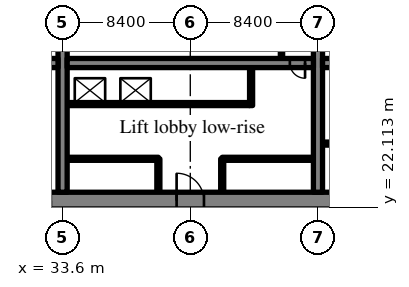
"""IFC4 building model, lengths in metres.
Left out: names, types, materials, properties, quantities, classifications, styles, units other than length and angle.
Written with IfcOpenShell. Run it as: python <this file> out.ifc"""

import sys

from ifc_helpers import new_model, si_unit, direction, frame, frame_2d, origin, place, context, subcontext, project, spatial, rectangle, extrude, source, transform, mapped, element, fill, save


model = new_model("IFC4")
c1 = context("Model", 3, precision=1e-05, world=origin(), true_north=direction((0.0, 1.0)))
c2 = subcontext(c1, "Body", "Model", "MODEL_VIEW")
j1 = project(units=[si_unit("LENGTHUNIT", "METRE"), si_unit("PLANEANGLEUNIT", "RADIAN")], contexts=[c1])
p1 = place(None, origin())
s1 = spatial("IfcSite", under=j1, at=p1, CompositionType="ELEMENT")
p2 = place(p1, origin())
s2 = spatial("IfcBuilding", under=s1, at=p2, CompositionType="ELEMENT")
p3 = place(p2, origin())
s3 = spatial("IfcBuildingStorey", under=s2, at=p3, CompositionType="ELEMENT", Elevation=0.0)
m1 = source(origin(), c2, "Body", "SweptSolid", [
    extrude(rectangle(XDim=50.4, YDim=1.1, at=frame_2d((25.2, 0.0))), origin(), (0.0, 0.0, 1.0), 5.72),
])
p4 = place(p3, frame((25.2, 22.55, 0.0), z_axis=(0.0, 0.0, 1.0), x_axis=(1.0, 0.0, 0.0)))
e1 = element("IfcWall", 1, at=p4, inside=s3, PredefinedType="SHEAR", context=c2, shape_type="MappedRepresentation", body=[
    mapped(m1, transform((0.0, 0.0, 0.0), scale=1.0)),
])
m2 = source(origin(), c2, "Body", "SweptSolid", [
    extrude(rectangle(XDim=1.8, YDim=2.1, at=frame_2d((0.9, 1.05))), frame((0.0, 0.56, 0.0), z_axis=(0.0, -1.0, 0.0), x_axis=(1.0, 0.0, 0.0)), (0.0, 0.0, 1.0), 1.12),
])
p5 = place(p4, frame((15.9, 0.0, 0.0)))
e2 = element("IfcOpeningElement", 2, at=p5, cuts=e1, PredefinedType="OPENING", context=c2, shape_type="MappedRepresentation", body=[
    mapped(m2, transform((0.0, 0.0, 0.0), scale=1.0)),
])
p6 = place(p4, frame((32.7, 0.0, 0.0)))
e3 = element("IfcOpeningElement", 3, at=p6, cuts=e1, PredefinedType="OPENING", context=c2, shape_type="MappedRepresentation", body=[
    mapped(m2, transform((0.0, 0.0, 0.0), scale=1.0)),
])
m3 = source(origin(), c2, "Body", "SweptSolid", [
    extrude(rectangle(XDim=0.9, YDim=2.1, at=frame_2d((0.45, 1.05))), frame((0.0, 0.56, 0.0), z_axis=(0.0, -1.0, 0.0), x_axis=(1.0, 0.0, 0.0)), (0.0, 0.0, 1.0), 1.12),
])
p7 = place(p4, frame((39.75, 0.0, 0.0)))
e4 = element("IfcOpeningElement", 4, at=p7, cuts=e1, PredefinedType="OPENING", context=c2, shape_type="MappedRepresentation", body=[
    mapped(m3, transform((0.0, 0.0, 0.0), scale=1.0)),
])
p8 = place(p4, frame((28.05, 0.0, 0.0)))
e5 = element("IfcOpeningElement", 5, at=p8, cuts=e1, PredefinedType="OPENING", context=c2, shape_type="MappedRepresentation", body=[
    mapped(m3, transform((0.0, 0.0, 0.0), scale=1.0)),
])
m4 = source(origin(), c2, "Body", "SweptSolid", [
    extrude(rectangle(XDim=1.2, YDim=2.1, at=frame_2d((0.6, 1.05))), frame((0.0, 0.56, 0.0), z_axis=(0.0, -1.0, 0.0), x_axis=(1.0, 0.0, 0.0)), (0.0, 0.0, 1.0), 1.12),
])
p9 = place(p4, frame((6.425, 0.0, 0.0)))
e6 = element("IfcOpeningElement", 6, at=p9, cuts=e1, PredefinedType="OPENING", context=c2, shape_type="MappedRepresentation", body=[
    mapped(m4, transform((0.0, 0.0, 0.0), scale=1.0)),
])
p10 = place(p4, frame((47.675, 0.0, 0.0)))
e7 = element("IfcOpeningElement", 7, at=p10, cuts=e1, PredefinedType="OPENING", context=c2, shape_type="MappedRepresentation", body=[
    mapped(m4, transform((0.0, 0.0, 0.0), scale=1.0)),
])
m5 = source(origin(), c2, "Body", "SweptSolid", [
    extrude(rectangle(XDim=17.8, YDim=0.6, at=frame_2d((8.9, 0.0))), origin(), (0.0, 0.0, 1.0), 5.72),
])
p11 = place(p3, frame((33.6, 23.1, 0.0), z_axis=(0.0, 0.0, 1.0), x_axis=(0.0, 1.0, 0.0)))
e8 = element("IfcWall", 8, at=p11, inside=s3, PredefinedType="SHEAR", context=c2, shape_type="MappedRepresentation", body=[
    mapped(m5, transform((0.0, 0.0, 0.0), scale=1.0)),
])
m6 = source(origin(), c2, "Body", "SweptSolid", [
    extrude(rectangle(XDim=1.1, YDim=2.1, at=frame_2d((0.55, 1.05))), frame((0.0, 0.31, 0.0), z_axis=(0.0, -1.0, 0.0), x_axis=(1.0, 0.0, 0.0)), (0.0, 0.0, 1.0), 0.62),
])
p12 = place(p11, frame((12.35, 0.0, 0.0)))
e9 = element("IfcOpeningElement", 9, at=p12, cuts=e8, PredefinedType="OPENING", context=c2, shape_type="MappedRepresentation", body=[
    mapped(m6, transform((0.0, 0.0, 0.0), scale=1.0)),
])
p13 = place(p3, frame((50.4, 23.1, 0.0), z_axis=(0.0, 0.0, 1.0), x_axis=(0.0, 1.0, 0.0)))
e10 = element("IfcWall", 10, at=p13, inside=s3, PredefinedType="SHEAR", context=c2, shape_type="MappedRepresentation", body=[
    mapped(m5, transform((0.0, 0.0, 0.0), scale=1.0)),
])
p14 = place(p13, frame((12.35, 0.0, 0.0)))
e11 = element("IfcOpeningElement", 11, at=p14, cuts=e10, PredefinedType="OPENING", context=c2, shape_type="MappedRepresentation", body=[
    mapped(m6, transform((0.0, 0.0, 0.0), scale=1.0)),
])
m7 = source(origin(), c2, "Body", "SweptSolid", [
    extrude(rectangle(XDim=7.0, YDim=0.6, at=frame_2d((3.5, 0.0))), origin(), (0.0, 0.0, 1.0), 5.72),
])
p15 = place(p3, frame((26.3, 31.6, 0.0), z_axis=(0.0, 0.0, 1.0), x_axis=(1.0, 0.0, 0.0)))
e12 = element("IfcWall", 12, at=p15, inside=s3, PredefinedType="SHEAR", context=c2, shape_type="MappedRepresentation", body=[
    mapped(m7, transform((0.0, 0.0, 0.0), scale=1.0)),
])
p16 = place(p15, frame((5.375, 0.0, 0.0)))
e13 = element("IfcOpeningElement", 13, at=p16, cuts=e12, PredefinedType="OPENING", context=c2, shape_type="MappedRepresentation", body=[
    mapped(m6, transform((0.0, 0.0, 0.0), scale=1.0)),
])
m8 = source(origin(), c2, "Body", "SweptSolid", [
    extrude(rectangle(XDim=16.2, YDim=0.6, at=frame_2d((8.1, 0.0))), origin(), (0.0, 0.0, 1.0), 5.72),
])
p17 = place(p3, frame((33.9, 31.6, 0.0), z_axis=(0.0, 0.0, 1.0), x_axis=(1.0, 0.0, 0.0)))
e14 = element("IfcWall", 14, at=p17, inside=s3, PredefinedType="SHEAR", context=c2, shape_type="MappedRepresentation", body=[
    mapped(m8, transform((0.0, 0.0, 0.0), scale=1.0)),
])
m9 = source(origin(), c2, "Body", "SweptSolid", [
    extrude(rectangle(XDim=1.0, YDim=2.1, at=frame_2d((0.5, 1.05))), frame((0.0, 0.31, 0.0), z_axis=(0.0, -1.0, 0.0), x_axis=(1.0, 0.0, 0.0)), (0.0, 0.0, 1.0), 0.62),
])
p18 = place(p17, frame((14.65, 0.0, 0.0)))
e15 = element("IfcOpeningElement", 15, at=p18, cuts=e14, PredefinedType="OPENING", context=c2, shape_type="MappedRepresentation", body=[
    mapped(m9, transform((0.0, 0.0, 0.0), scale=1.0)),
])
m10 = source(origin(), c2, "Body", "SweptSolid", [
    extrude(rectangle(XDim=16.2, YDim=0.6, at=frame_2d((8.1, 0.0))), origin(), (0.0, 0.0, 1.0), 5.72),
])
p19 = place(p3, frame((50.7, 31.6, 0.0), z_axis=(0.0, 0.0, 1.0), x_axis=(1.0, 0.0, 0.0)))
e16 = element("IfcWall", 16, at=p19, inside=s3, PredefinedType="SHEAR", context=c2, shape_type="MappedRepresentation", body=[
    mapped(m10, transform((0.0, 0.0, 0.0), scale=1.0)),
])
p20 = place(p19, frame((0.55, 0.0, 0.0)))
e17 = element("IfcOpeningElement", 17, at=p20, cuts=e16, PredefinedType="OPENING", context=c2, shape_type="MappedRepresentation", body=[
    mapped(m9, transform((0.0, 0.0, 0.0), scale=1.0)),
])
m11 = source(origin(), c2, "Body", "SweptSolid", [
    extrude(rectangle(XDim=6.0, YDim=0.2, at=frame_2d((3.0, 0.0))), origin(), (0.0, 0.0, 1.0), 5.72),
])
p21 = place(p3, frame((33.9, 25.3, 0.0), z_axis=(0.0, 0.0, 1.0), x_axis=(1.0, 0.0, 0.0)))
e18 = element("IfcWall", 18, at=p21, inside=s3, PredefinedType="SOLIDWALL", context=c2, shape_type="MappedRepresentation", body=[
    mapped(m11, transform((0.0, 0.0, 0.0), scale=1.0)),
])
m12 = source(origin(), c2, "Body", "SweptSolid", [
    extrude(rectangle(XDim=1.1, YDim=2.1, at=frame_2d((0.55, 1.05))), frame((0.0, 0.11, 0.0), z_axis=(0.0, -1.0, 0.0), x_axis=(1.0, 0.0, 0.0)), (0.0, 0.0, 1.0), 0.22),
])
p22 = place(p21, frame((0.95, 0.0, 0.0)))
e19 = element("IfcOpeningElement", 19, at=p22, cuts=e18, PredefinedType="OPENING", context=c2, shape_type="MappedRepresentation", body=[
    mapped(m12, transform((0.0, 0.0, 0.0), scale=1.0)),
])
p23 = place(p21, frame((3.95, 0.0, 0.0)))
e20 = element("IfcOpeningElement", 20, at=p23, cuts=e18, PredefinedType="OPENING", context=c2, shape_type="MappedRepresentation", body=[
    mapped(m12, transform((0.0, 0.0, 0.0), scale=1.0)),
])
p24 = place(p3, frame((44.1, 25.3, 0.0), z_axis=(0.0, 0.0, 1.0), x_axis=(1.0, 0.0, 0.0)))
e21 = element("IfcWall", 21, at=p24, inside=s3, PredefinedType="SOLIDWALL", context=c2, shape_type="MappedRepresentation", body=[
    mapped(m11, transform((0.0, 0.0, 0.0), scale=1.0)),
])
p25 = place(p24, frame((0.95, 0.0, 0.0)))
e22 = element("IfcOpeningElement", 22, at=p25, cuts=e21, PredefinedType="OPENING", context=c2, shape_type="MappedRepresentation", body=[
    mapped(m12, transform((0.0, 0.0, 0.0), scale=1.0)),
])
p26 = place(p24, frame((3.95, 0.0, 0.0)))
e23 = element("IfcOpeningElement", 23, at=p26, cuts=e21, PredefinedType="OPENING", context=c2, shape_type="MappedRepresentation", body=[
    mapped(m12, transform((0.0, 0.0, 0.0), scale=1.0)),
])
m13 = source(origin(), c2, "Body", "SweptSolid", [
    extrude(rectangle(XDim=12.0, YDim=0.2, at=frame_2d((6.0, 0.0))), origin(), (0.0, 0.0, 1.0), 5.72),
])
p27 = place(p3, frame((33.9, 28.9, 0.0), z_axis=(0.0, 0.0, 1.0), x_axis=(1.0, 0.0, 0.0)))
e24 = element("IfcWall", 24, at=p27, inside=s3, PredefinedType="SOLIDWALL", context=c2, shape_type="MappedRepresentation", body=[
    mapped(m13, transform((0.0, 0.0, 0.0), scale=1.0)),
])
p28 = place(p27, frame((0.95, 0.0, 0.0)))
e25 = element("IfcOpeningElement", 25, at=p28, cuts=e24, PredefinedType="OPENING", context=c2, shape_type="MappedRepresentation", body=[
    mapped(m12, transform((0.0, 0.0, 0.0), scale=1.0)),
])
p29 = place(p27, frame((3.95, 0.0, 0.0)))
e26 = element("IfcOpeningElement", 26, at=p29, cuts=e24, PredefinedType="OPENING", context=c2, shape_type="MappedRepresentation", body=[
    mapped(m12, transform((0.0, 0.0, 0.0), scale=1.0)),
])
p30 = place(p27, frame((6.95, 0.0, 0.0)))
e27 = element("IfcOpeningElement", 27, at=p30, cuts=e24, PredefinedType="OPENING", context=c2, shape_type="MappedRepresentation", body=[
    mapped(m12, transform((0.0, 0.0, 0.0), scale=1.0)),
])
p31 = place(p27, frame((9.95, 0.0, 0.0)))
e28 = element("IfcOpeningElement", 28, at=p31, cuts=e24, PredefinedType="OPENING", context=c2, shape_type="MappedRepresentation", body=[
    mapped(m12, transform((0.0, 0.0, 0.0), scale=1.0)),
])
m14 = source(origin(), c2, "Body", "SweptSolid", [
    extrude(rectangle(XDim=2.2, YDim=0.2, at=frame_2d((1.1, 0.0))), origin(), (0.0, 0.0, 1.0), 5.72),
])
for number, where, z_axis, x_axis in (
    (29, (39.9, 23.1, 0.0), (0.0, 0.0, 1.0), (0.0, 1.0, 0.0)),
    (30, (44.1, 23.1, 0.0), (0.0, 0.0, 1.0), (0.0, 1.0, 0.0)),
):
    element("IfcWall", number, at=place(p3, frame(where, z_axis=z_axis, x_axis=x_axis)), inside=s3, PredefinedType="SOLIDWALL", context=c2, shape_type="MappedRepresentation", body=[
        mapped(m14, transform((0.0, 0.0, 0.0), scale=1.0)),
    ])
m15 = source(origin(), c2, "Body", "SweptSolid", [
    extrude(rectangle(XDim=2.5, YDim=0.2, at=frame_2d((1.25, 0.0))), origin(), (0.0, 0.0, 1.0), 5.72),
])
p32 = place(p3, frame((46.0, 28.8, 0.0), z_axis=(0.0, 0.0, 1.0), x_axis=(0.0, 1.0, 0.0)))
e31 = element("IfcWall", 31, at=p32, inside=s3, PredefinedType="SOLIDWALL", context=c2, shape_type="MappedRepresentation", body=[
    mapped(m15, transform((0.0, 0.0, 0.0), scale=1.0)),
])
m16 = source(origin(), c2, "Body", "SweptSolid", [
    extrude(rectangle(XDim=3.1, YDim=0.15, at=frame_2d((1.55, 0.0))), origin(), (0.0, 0.0, 1.0), 5.72),
])
p33 = place(p3, frame((48.0, 31.9, 0.0), z_axis=(0.0, 0.0, 1.0), x_axis=(0.0, 1.0, 0.0)))
e32 = element("IfcWall", 32, at=p33, inside=s3, PredefinedType="PARTITIONING", context=c2, shape_type="MappedRepresentation", body=[
    mapped(m16, transform((0.0, 0.0, 0.0), scale=1.0)),
])
p34 = place(p3, frame((56.7, 26.3, 0.0), z_axis=(0.0, 0.0, 1.0), x_axis=(-1.0, 0.0, 0.0)))
e33 = element("IfcWall", 33, at=p34, inside=s3, PredefinedType="PARTITIONING", context=c2, shape_type="MappedRepresentation", body=[
    mapped(m11, transform((0.0, 0.0, 0.0), scale=1.0)),
])
m17 = source(origin(), c2, "Body", "SweptSolid", [
    extrude(rectangle(XDim=1.8, YDim=2.1, at=frame_2d((0.9, 1.05))), frame((0.0, 0.325, 0.0), z_axis=(0.0, -1.0, 0.0), x_axis=(1.0, 0.0, 0.0)), (0.0, 0.0, 1.0), 0.05),
])
p35 = place(p5, origin())
e34 = element("IfcDoor", 34, at=p35, inside=s3, OperationType="DOUBLE_DOOR_SINGLE_SWING", PredefinedType="DOOR", context=c2, shape_type="MappedRepresentation", body=[
    mapped(m17, transform((0.0, 0.0, 0.0), scale=1.0)),
])
fill(e2, e34)
m18 = source(origin(), c2, "Body", "SweptSolid", [
    extrude(rectangle(XDim=1.0, YDim=2.1, at=frame_2d((0.5, 1.05))), frame((0.0, 0.025, 0.0), z_axis=(0.0, -1.0, 0.0), x_axis=(1.0, 0.0, 0.0)), (0.0, 0.0, 1.0), 0.05),
])
p36 = place(p18, origin())
e35 = element("IfcDoor", 35, at=p36, inside=s3, OperationType="SINGLE_SWING_RIGHT", PredefinedType="DOOR", context=c2, shape_type="MappedRepresentation", body=[
    mapped(m18, transform((0.0, 0.0, 0.0), scale=1.0)),
])
fill(e15, e35)
m19 = source(origin(), c2, "Body", "SweptSolid", [
    extrude(rectangle(XDim=1.1, YDim=2.1, at=frame_2d((0.55, 1.05))), frame((0.0, 0.025, 0.0), z_axis=(0.0, -1.0, 0.0), x_axis=(1.0, 0.0, 0.0)), (0.0, 0.0, 1.0), 0.05),
])
p37 = place(p22, origin())
e36 = element("IfcDoor", 36, at=p37, inside=s3, OperationType="SLIDING_TO_LEFT", PredefinedType="DOOR", context=c2, shape_type="MappedRepresentation", body=[
    mapped(m19, transform((0.0, 0.0, 0.0), scale=1.0)),
])
fill(e19, e36)
p38 = place(p23, origin())
e37 = element("IfcDoor", 37, at=p38, inside=s3, OperationType="SLIDING_TO_RIGHT", PredefinedType="DOOR", context=c2, shape_type="MappedRepresentation", body=[
    mapped(m19, transform((0.0, 0.0, 0.0), scale=1.0)),
])
fill(e20, e37)
p39 = place(p25, origin())
e38 = element("IfcDoor", 38, at=p39, inside=s3, OperationType="SLIDING_TO_LEFT", PredefinedType="DOOR", context=c2, shape_type="MappedRepresentation", body=[
    mapped(m19, transform((0.0, 0.0, 0.0), scale=1.0)),
])
fill(e22, e38)
p40 = place(p26, origin())
e39 = element("IfcDoor", 39, at=p40, inside=s3, OperationType="SLIDING_TO_RIGHT", PredefinedType="DOOR", context=c2, shape_type="MappedRepresentation", body=[
    mapped(m19, transform((0.0, 0.0, 0.0), scale=1.0)),
])
fill(e23, e39)
p41 = place(p28, origin())
e40 = element("IfcDoor", 40, at=p41, inside=s3, OperationType="SLIDING_TO_LEFT", PredefinedType="DOOR", context=c2, shape_type="MappedRepresentation", body=[
    mapped(m19, transform((0.0, 0.0, 0.0), scale=1.0)),
])
fill(e25, e40)
p42 = place(p29, origin())
e41 = element("IfcDoor", 41, at=p42, inside=s3, OperationType="SLIDING_TO_RIGHT", PredefinedType="DOOR", context=c2, shape_type="MappedRepresentation", body=[
    mapped(m19, transform((0.0, 0.0, 0.0), scale=1.0)),
])
fill(e26, e41)
p43 = place(p30, origin())
e42 = element("IfcDoor", 42, at=p43, inside=s3, OperationType="SLIDING_TO_LEFT", PredefinedType="DOOR", context=c2, shape_type="MappedRepresentation", body=[
    mapped(m19, transform((0.0, 0.0, 0.0), scale=1.0)),
])
fill(e27, e42)
p44 = place(p31, origin())
e43 = element("IfcDoor", 43, at=p44, inside=s3, OperationType="SLIDING_TO_RIGHT", PredefinedType="DOOR", context=c2, shape_type="MappedRepresentation", body=[
    mapped(m19, transform((0.0, 0.0, 0.0), scale=1.0)),
])
fill(e28, e43)
save(model, sys.argv[1])
